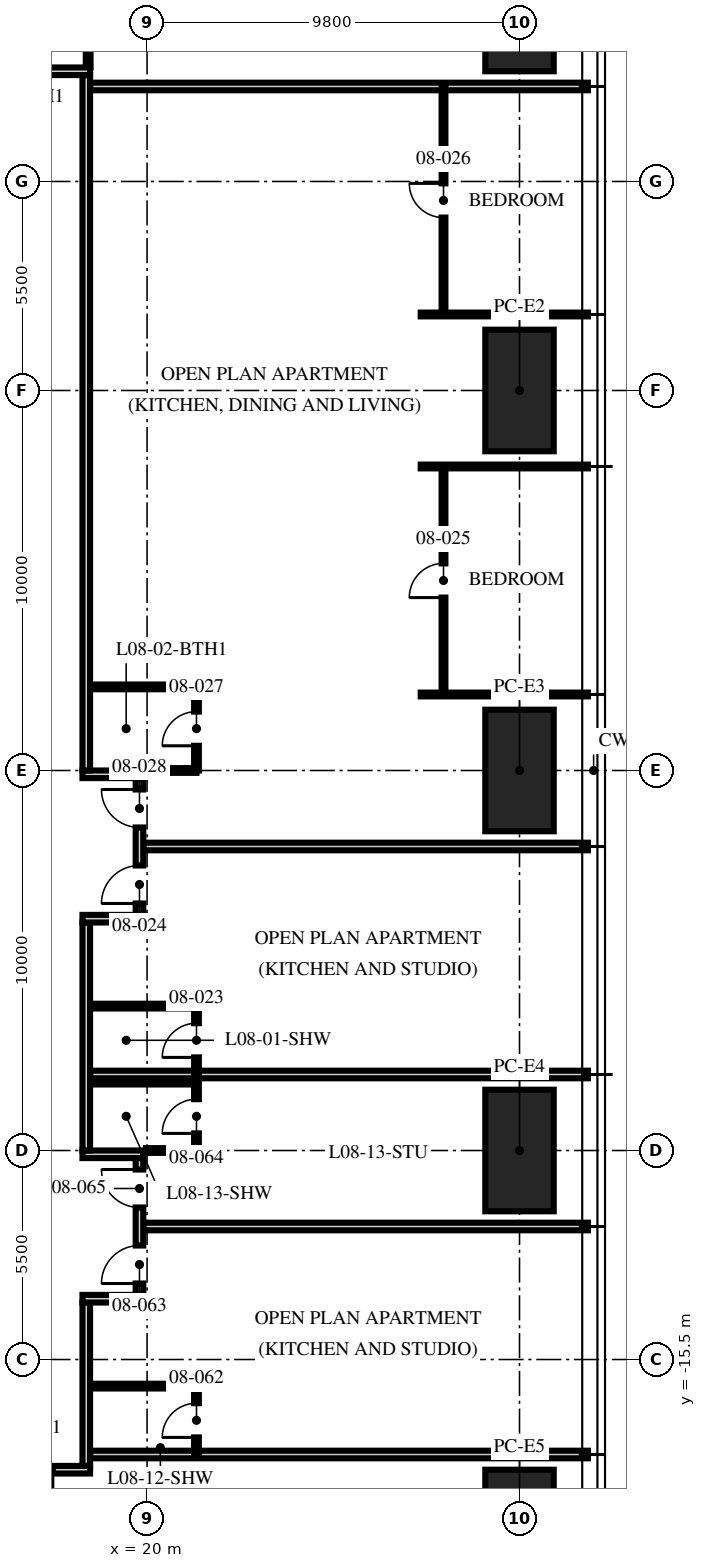
"""IFC4 building model, lengths in metres.
Left out: names, types, materials, properties, quantities, classifications, styles, units other than length and angle.
Written with IfcOpenShell. Run it as: python <this file> out.ifc"""

import sys

from ifc_helpers import new_model, si_unit, direction, frame, frame_2d, origin, origin_2d, place, context, subcontext, project, spatial, rectangle, hollow_rectangle, extrude, element, fill, save


model = new_model("IFC4")
c1 = context("Model", 3, precision=1e-05, world=origin(), true_north=direction((0.0, 1.0)))
c2 = subcontext(c1, "Body", "Model", "MODEL_VIEW")
j1 = project(units=[si_unit("LENGTHUNIT", "METRE"), si_unit("PLANEANGLEUNIT", "RADIAN")], contexts=[c1])
p1 = place(None, origin())
s1 = spatial("IfcSite", under=j1, at=p1, CompositionType="ELEMENT")
p2 = place(p1, origin())
s2 = spatial("IfcBuilding", under=s1, at=p2, CompositionType="ELEMENT")
p3 = place(p2, frame((0.0, 0.0, 36.0)))
s3 = spatial("IfcBuildingStorey", under=s2, at=p3, CompositionType="ELEMENT", Elevation=36.0)
for number, where, z_axis, x_axis in (
    (1, (29.8, 20.0, 0.0), (0.0, 0.0, 1.0), (0.0, 1.0, 0.0)),
    (2, (29.8, 10.0, 0.0), (0.0, 0.0, 1.0), (0.0, 1.0, 0.0)),
    (3, (29.8, 0.0, 0.0), (0.0, 0.0, 1.0), (0.0, 1.0, 0.0)),
    (4, (29.8, -10.0, 0.0), (0.0, 0.0, 1.0), (0.0, 1.0, 0.0)),
    (5, (29.8, -20.0, 0.0), (0.0, 0.0, 1.0), (0.0, 1.0, 0.0)),
):
    element("IfcColumn", number, at=place(p3, frame(where, z_axis=z_axis, x_axis=x_axis)), inside=s3, PredefinedType="COLUMN", context=c2, shape_type="SweptSolid", body=[
        extrude(hollow_rectangle(XDim=3.2, YDim=1.8, WallThickness=0.2, at=origin_2d()), origin(), (0.0, 0.0, 1.0), 3.75),
    ])
p4 = place(p3, frame((18.5, -8.0, 0.0), z_axis=(0.0, 0.0, 1.0), x_axis=(1.0, 0.0, 0.0)))
e6 = element("IfcWall", 6, at=p4, inside=s3, PredefinedType="PARTITIONING", context=c2, shape_type="SweptSolid", body=[
    extrude(rectangle(XDim=13.1, YDim=0.2, at=frame_2d((6.55, 0.0))), origin(), (0.0, 0.0, 1.0), 2.71),
])
p5 = place(p3, frame((19.9, -2.0, 0.0), z_axis=(0.0, 0.0, 1.0), x_axis=(1.0, 0.0, 0.0)))
e7 = element("IfcWall", 7, at=p5, inside=s3, PredefinedType="PARTITIONING", context=c2, shape_type="SweptSolid", body=[
    extrude(rectangle(XDim=11.7, YDim=0.2, at=frame_2d((5.85, 0.0))), origin(), (0.0, 0.0, 1.0), 2.71),
])
for number, where, z_axis, x_axis in (
    (8, (27.2, 2.0, 0.0), (0.0, 0.0, 1.0), (1.0, 0.0, 0.0)),
    (9, (27.2, 8.0, 0.0), (0.0, 0.0, 1.0), (1.0, 0.0, 0.0)),
    (10, (27.2, 12.0, 0.0), (0.0, 0.0, 1.0), (1.0, 0.0, 0.0)),
):
    element("IfcWall", number, at=place(p3, frame(where, z_axis=z_axis, x_axis=x_axis)), inside=s3, PredefinedType="PARTITIONING", context=c2, shape_type="SweptSolid", body=[
        extrude(rectangle(XDim=4.4, YDim=0.1, at=frame_2d((2.2, 0.0))), origin(), (0.0, 0.0, 1.0), 2.71),
    ])
for number, where, z_axis, x_axis in (
    (11, (18.5, 18.0, 0.0), (0.0, 0.0, 1.0), (1.0, 0.0, 0.0)),
    (12, (18.5, -18.0, 0.0), (0.0, 0.0, 1.0), (1.0, 0.0, 0.0)),
):
    element("IfcWall", number, at=place(p3, frame(where, z_axis=z_axis, x_axis=x_axis)), inside=s3, PredefinedType="PARTITIONING", context=c2, shape_type="SweptSolid", body=[
        extrude(rectangle(XDim=13.1, YDim=0.2, at=frame_2d((6.55, 0.0))), origin(), (0.0, 0.0, 1.0), 2.3),
    ])
p6 = place(p3, frame((19.9, -12.0, 0.0), z_axis=(0.0, 0.0, 1.0), x_axis=(1.0, 0.0, 0.0)))
e13 = element("IfcWall", 13, at=p6, inside=s3, PredefinedType="PARTITIONING", context=c2, shape_type="SweptSolid", body=[
    extrude(rectangle(XDim=11.7, YDim=0.2, at=frame_2d((5.85, 0.0))), origin(), (0.0, 0.0, 1.0), 2.71),
])
p7 = place(p3, frame((21.3, -8.0, 0.0), z_axis=(0.0, 0.0, 1.0), x_axis=(0.0, 1.0, 0.0)))
e14 = element("IfcWall", 14, at=p7, inside=s3, PredefinedType="PARTITIONING", context=c2, shape_type="SweptSolid", body=[
    extrude(rectangle(XDim=1.8, YDim=0.125, at=frame_2d((0.9, 0.0))), origin(), (0.0, 0.0, 1.0), 3.5),
])
p8 = place(p7, frame((0.45, 0.0, 0.0)))
e15 = element("IfcOpeningElement", 15, at=p8, cuts=e14, PredefinedType="OPENING", context=c2, shape_type="SweptSolid", body=[
    extrude(rectangle(XDim=0.9, YDim=2.1, at=frame_2d((0.45, 1.05))), frame((0.0, 0.073, 0.0), z_axis=(0.0, -1.0, 0.0), x_axis=(1.0, 0.0, 0.0)), (0.0, 0.0, 1.0), 0.145),
])
p9 = place(p3, frame((18.5, -6.2, 0.0), z_axis=(0.0, 0.0, 1.0), x_axis=(1.0, 0.0, 0.0)))
e16 = element("IfcWall", 16, at=p9, inside=s3, PredefinedType="PARTITIONING", context=c2, shape_type="SweptSolid", body=[
    extrude(rectangle(XDim=2.8, YDim=0.125, at=frame_2d((1.4, 0.0))), origin(), (0.0, 0.0, 1.0), 3.5),
])
p10 = place(p3, frame((27.8, 2.0, 0.0), z_axis=(0.0, 0.0, 1.0), x_axis=(0.0, 1.0, 0.0)))
e17 = element("IfcWall", 17, at=p10, inside=s3, PredefinedType="PARTITIONING", context=c2, shape_type="SweptSolid", body=[
    extrude(rectangle(XDim=6.0, YDim=0.1, at=frame_2d((3.0, 0.0))), origin(), (0.0, 0.0, 1.0), 2.61),
])
p11 = place(p10, frame((2.55, 0.0, 0.0)))
e18 = element("IfcOpeningElement", 18, at=p11, cuts=e17, PredefinedType="OPENING", context=c2, shape_type="SweptSolid", body=[
    extrude(rectangle(XDim=0.9, YDim=2.1, at=frame_2d((0.45, 1.05))), frame((0.0, 0.06, 0.0), z_axis=(0.0, -1.0, 0.0), x_axis=(1.0, 0.0, 0.0)), (0.0, 0.0, 1.0), 0.12),
])
p12 = place(p3, frame((27.8, 12.0, 0.0), z_axis=(0.0, 0.0, 1.0), x_axis=(0.0, 1.0, 0.0)))
e19 = element("IfcWall", 19, at=p12, inside=s3, PredefinedType="PARTITIONING", context=c2, shape_type="SweptSolid", body=[
    extrude(rectangle(XDim=6.0, YDim=0.1, at=frame_2d((3.0, 0.0))), origin(), (0.0, 0.0, 1.0), 2.61),
])
p13 = place(p12, frame((2.55, 0.0, 0.0)))
e20 = element("IfcOpeningElement", 20, at=p13, cuts=e19, PredefinedType="OPENING", context=c2, shape_type="SweptSolid", body=[
    extrude(rectangle(XDim=0.9, YDim=2.1, at=frame_2d((0.45, 1.05))), frame((0.0, 0.06, 0.0), z_axis=(0.0, -1.0, 0.0), x_axis=(1.0, 0.0, 0.0)), (0.0, 0.0, 1.0), 0.12),
])
p14 = place(p3, frame((21.3, 0.0, 0.0), z_axis=(0.0, 0.0, 1.0), x_axis=(0.0, 1.0, 0.0)))
e21 = element("IfcWall", 21, at=p14, inside=s3, PredefinedType="PARTITIONING", context=c2, shape_type="SweptSolid", body=[
    extrude(rectangle(XDim=2.2, YDim=0.125, at=frame_2d((1.1, 0.0))), origin(), (0.0, 0.0, 1.0), 2.492),
])
p15 = place(p14, frame((0.65, 0.0, 0.0)))
e22 = element("IfcOpeningElement", 22, at=p15, cuts=e21, PredefinedType="OPENING", context=c2, shape_type="SweptSolid", body=[
    extrude(rectangle(XDim=0.9, YDim=2.1, at=frame_2d((0.45, 1.05))), frame((0.0, 0.073, 0.0), z_axis=(0.0, -1.0, 0.0), x_axis=(1.0, 0.0, 0.0)), (0.0, 0.0, 1.0), 0.145),
])
p16 = place(p3, frame((19.97, 0.0, 0.0), z_axis=(0.0, 0.0, 1.0), x_axis=(1.0, 0.0, 0.0)))
e23 = element("IfcWall", 23, at=p16, inside=s3, PredefinedType="PARTITIONING", context=c2, shape_type="SweptSolid", body=[
    extrude(rectangle(XDim=1.33, YDim=0.125, at=frame_2d((0.665, 0.0))), origin(), (0.0, 0.0, 1.0), 2.492),
])
p17 = place(p3, frame((18.5, 2.2, 0.0), z_axis=(0.0, 0.0, 1.0), x_axis=(1.0, 0.0, 0.0)))
e24 = element("IfcWall", 24, at=p17, inside=s3, PredefinedType="PARTITIONING", context=c2, shape_type="SweptSolid", body=[
    extrude(rectangle(XDim=2.8, YDim=0.125, at=frame_2d((1.4, 0.0))), origin(), (0.0, 0.0, 1.0), 3.5),
])
p18 = place(p3, frame((18.45, 18.5, 0.0), z_axis=(0.0, 0.0, 1.0), x_axis=(0.0, 1.0, 0.0)))
e25 = element("IfcWall", 25, at=p18, inside=s3, PredefinedType="PARTITIONING", context=c2, shape_type="SweptSolid", body=[
    extrude(rectangle(XDim=2.8, YDim=0.125, at=frame_2d((1.4, 0.0))), origin(), (0.0, 0.0, 1.0), 2.3),
])
p19 = place(p3, frame((21.3, -18.0, 0.0), z_axis=(0.0, 0.0, 1.0), x_axis=(0.0, 1.0, 0.0)))
e26 = element("IfcWall", 26, at=p19, inside=s3, PredefinedType="PARTITIONING", context=c2, shape_type="SweptSolid", body=[
    extrude(rectangle(XDim=1.8, YDim=0.125, at=frame_2d((0.9, 0.0))), origin(), (0.0, 0.0, 1.0), 3.5),
])
p20 = place(p19, frame((0.45, 0.0, 0.0)))
e27 = element("IfcOpeningElement", 27, at=p20, cuts=e26, PredefinedType="OPENING", context=c2, shape_type="SweptSolid", body=[
    extrude(rectangle(XDim=0.9, YDim=2.1, at=frame_2d((0.45, 1.05))), frame((0.0, 0.073, 0.0), z_axis=(0.0, -1.0, 0.0), x_axis=(1.0, 0.0, 0.0)), (0.0, 0.0, 1.0), 0.145),
])
p21 = place(p3, frame((18.5, -16.2, 0.0), z_axis=(0.0, 0.0, 1.0), x_axis=(1.0, 0.0, 0.0)))
e28 = element("IfcWall", 28, at=p21, inside=s3, PredefinedType="PARTITIONING", context=c2, shape_type="SweptSolid", body=[
    extrude(rectangle(XDim=2.8, YDim=0.125, at=frame_2d((1.4, 0.0))), origin(), (0.0, 0.0, 1.0), 3.5),
])
p22 = place(p3, frame((21.3, -10.0, 0.0), z_axis=(0.0, 0.0, 1.0), x_axis=(0.0, 1.0, 0.0)))
e29 = element("IfcWall", 29, at=p22, inside=s3, PredefinedType="PARTITIONING", context=c2, shape_type="SweptSolid", body=[
    extrude(rectangle(XDim=1.8, YDim=0.125, at=frame_2d((0.9, 0.0))), origin(), (0.0, 0.0, 1.0), 2.492),
])
p23 = place(p22, frame((0.45, 0.0, 0.0)))
e30 = element("IfcOpeningElement", 30, at=p23, cuts=e29, PredefinedType="OPENING", context=c2, shape_type="SweptSolid", body=[
    extrude(rectangle(XDim=0.9, YDim=2.1, at=frame_2d((0.45, 1.05))), frame((0.0, 0.073, 0.0), z_axis=(0.0, -1.0, 0.0), x_axis=(1.0, 0.0, 0.0)), (0.0, 0.0, 1.0), 0.145),
])
p24 = place(p3, frame((19.97, -10.0, 0.0), z_axis=(0.0, 0.0, 1.0), x_axis=(1.0, 0.0, 0.0)))
e31 = element("IfcWall", 31, at=p24, inside=s3, PredefinedType="PARTITIONING", context=c2, shape_type="SweptSolid", body=[
    extrude(rectangle(XDim=1.33, YDim=0.125, at=frame_2d((0.665, 0.0))), origin(), (0.0, 0.0, 1.0), 2.492),
])
p25 = place(p3, frame((18.5, -8.2, 0.0), z_axis=(0.0, 0.0, 1.0), x_axis=(1.0, 0.0, 0.0)))
e32 = element("IfcWall", 32, at=p25, inside=s3, PredefinedType="PARTITIONING", context=c2, shape_type="SweptSolid", body=[
    extrude(rectangle(XDim=2.8, YDim=0.125, at=frame_2d((1.4, 0.0))), origin(), (0.0, 0.0, 1.0), 3.5),
])
p26 = place(p3, frame((18.4, -18.3, 0.0), z_axis=(0.0, 0.0, 1.0), x_axis=(0.0, 1.0, 0.0)))
e33 = element("IfcWall", 33, at=p26, inside=s3, PredefinedType="PARTITIONING", context=c2, shape_type="SweptSolid", body=[
    extrude(rectangle(XDim=4.3, YDim=0.2, at=frame_2d((2.15, 0.0))), origin(), (0.0, 0.0, 1.0), 2.3),
])
p27 = place(p3, frame((18.3, -13.9, 0.0), z_axis=(0.0, 0.0, 1.0), x_axis=(1.0, 0.0, 0.0)))
e34 = element("IfcWall", 34, at=p27, inside=s3, PredefinedType="PARTITIONING", context=c2, shape_type="SweptSolid", body=[
    extrude(rectangle(XDim=1.6, YDim=0.2, at=frame_2d((0.8, 0.0))), origin(), (0.0, 0.0, 1.0), 3.5),
])
p28 = place(p3, frame((18.3, -10.1, 0.0), z_axis=(0.0, 0.0, 1.0), x_axis=(1.0, 0.0, 0.0)))
e35 = element("IfcWall", 35, at=p28, inside=s3, PredefinedType="PARTITIONING", context=c2, shape_type="SweptSolid", body=[
    extrude(rectangle(XDim=1.6, YDim=0.2, at=frame_2d((0.8, 0.0))), origin(), (0.0, 0.0, 1.0), 2.492),
])
p29 = place(p3, frame((19.8, -13.8, 0.0), z_axis=(0.0, 0.0, 1.0), x_axis=(0.0, 1.0, 0.0)))
e36 = element("IfcWall", 36, at=p29, inside=s3, PredefinedType="PARTITIONING", context=c2, shape_type="SweptSolid", body=[
    extrude(rectangle(XDim=3.6, YDim=0.2, at=frame_2d((1.8, 0.0))), origin(), (0.0, 0.0, 1.0), 3.5),
])
p30 = place(p29, frame((0.3, 0.0, 0.0)))
e37 = element("IfcOpeningElement", 37, at=p30, cuts=e36, PredefinedType="OPENING", context=c2, shape_type="SweptSolid", body=[
    extrude(rectangle(XDim=1.0, YDim=2.2, at=frame_2d((0.5, 1.1))), frame((0.0, 0.11, 0.0), z_axis=(0.0, -1.0, 0.0), x_axis=(1.0, 0.0, 0.0)), (0.0, 0.0, 1.0), 0.22),
])
p31 = place(p29, frame((2.3, 0.0, 0.0)))
e38 = element("IfcOpeningElement", 38, at=p31, cuts=e36, PredefinedType="OPENING", context=c2, shape_type="SweptSolid", body=[
    extrude(rectangle(XDim=1.0, YDim=2.2, at=frame_2d((0.5, 1.1))), frame((0.0, 0.11, 0.0), z_axis=(0.0, -1.0, 0.0), x_axis=(1.0, 0.0, 0.0)), (0.0, 0.0, 1.0), 0.22),
])
p32 = place(p3, frame((18.4, -10.0, 0.0), z_axis=(0.0, 0.0, 1.0), x_axis=(0.0, 1.0, 0.0)))
e39 = element("IfcWall", 39, at=p32, inside=s3, PredefinedType="PARTITIONING", context=c2, shape_type="SweptSolid", body=[
    extrude(rectangle(XDim=6.0, YDim=0.2, at=frame_2d((3.0, 0.0))), origin(), (0.0, 0.0, 1.0), 2.492),
])
p33 = place(p3, frame((18.3, -3.9, 0.0), z_axis=(0.0, 0.0, 1.0), x_axis=(1.0, 0.0, 0.0)))
e40 = element("IfcWall", 40, at=p33, inside=s3, PredefinedType="PARTITIONING", context=c2, shape_type="SweptSolid", body=[
    extrude(rectangle(XDim=1.6, YDim=0.2, at=frame_2d((0.8, 0.0))), origin(), (0.0, 0.0, 1.0), 3.5),
])
p34 = place(p3, frame((18.3, -0.1, 0.0), z_axis=(0.0, 0.0, 1.0), x_axis=(1.0, 0.0, 0.0)))
e41 = element("IfcWall", 41, at=p34, inside=s3, PredefinedType="PARTITIONING", context=c2, shape_type="SweptSolid", body=[
    extrude(rectangle(XDim=1.6, YDim=0.2, at=frame_2d((0.8, 0.0))), origin(), (0.0, 0.0, 1.0), 2.492),
])
p35 = place(p3, frame((19.8, -3.8, 0.0), z_axis=(0.0, 0.0, 1.0), x_axis=(0.0, 1.0, 0.0)))
e42 = element("IfcWall", 42, at=p35, inside=s3, PredefinedType="PARTITIONING", context=c2, shape_type="SweptSolid", body=[
    extrude(rectangle(XDim=3.6, YDim=0.2, at=frame_2d((1.8, 0.0))), origin(), (0.0, 0.0, 1.0), 3.5),
])
p36 = place(p35, frame((0.3, 0.0, 0.0)))
e43 = element("IfcOpeningElement", 43, at=p36, cuts=e42, PredefinedType="OPENING", context=c2, shape_type="SweptSolid", body=[
    extrude(rectangle(XDim=1.0, YDim=2.2, at=frame_2d((0.5, 1.1))), frame((0.0, 0.11, 0.0), z_axis=(0.0, -1.0, 0.0), x_axis=(1.0, 0.0, 0.0)), (0.0, 0.0, 1.0), 0.22),
])
p37 = place(p35, frame((2.3, 0.0, 0.0)))
e44 = element("IfcOpeningElement", 44, at=p37, cuts=e42, PredefinedType="OPENING", context=c2, shape_type="SweptSolid", body=[
    extrude(rectangle(XDim=1.0, YDim=2.2, at=frame_2d((0.5, 1.1))), frame((0.0, 0.11, 0.0), z_axis=(0.0, -1.0, 0.0), x_axis=(1.0, 0.0, 0.0)), (0.0, 0.0, 1.0), 0.22),
])
p38 = place(p3, frame((18.4, 0.0, 0.0), z_axis=(0.0, 0.0, 1.0), x_axis=(0.0, 1.0, 0.0)))
e45 = element("IfcWall", 45, at=p38, inside=s3, PredefinedType="PARTITIONING", context=c2, shape_type="SweptSolid", body=[
    extrude(rectangle(XDim=18.3, YDim=0.2, at=frame_2d((9.15, 0.0))), origin(), (0.0, 0.0, 1.0), 2.3),
])
p39 = place(p3, frame((10.0, 18.4, 0.0), z_axis=(0.0, 0.0, 1.0), x_axis=(1.0, 0.0, 0.0)))
e46 = element("IfcWall", 46, at=p39, inside=s3, PredefinedType="PARTITIONING", context=c2, shape_type="SweptSolid", body=[
    extrude(rectangle(XDim=8.5, YDim=0.2, at=frame_2d((4.25, 0.0))), origin(), (0.0, 0.0, 1.0), 2.3),
])
p40 = place(p3, frame((18.5, -18.4, 0.0), z_axis=(0.0, 0.0, 1.0), x_axis=(-1.0, 0.0, 0.0)))
e47 = element("IfcWall", 47, at=p40, inside=s3, PredefinedType="PARTITIONING", context=c2, shape_type="SweptSolid", body=[
    extrude(rectangle(XDim=37.0, YDim=0.2, at=frame_2d((18.5, 0.0))), origin(), (0.0, 0.0, 1.0), 2.3),
])
p41 = place(p40, frame((26.93, 0.0, 0.0)))
e48 = element("IfcOpeningElement", 48, at=p41, cuts=e47, PredefinedType="OPENING", context=c2, shape_type="SweptSolid", body=[
    extrude(rectangle(XDim=1.0, YDim=2.2, at=frame_2d((0.5, 1.1))), frame((0.0, 0.11, 0.0), z_axis=(0.0, -1.0, 0.0), x_axis=(1.0, 0.0, 0.0)), (0.0, 0.0, 1.0), 0.22),
])
p42 = place(p40, frame((0.98, 0.0, 0.0)))
e49 = element("IfcOpeningElement", 49, at=p42, cuts=e47, PredefinedType="OPENING", context=c2, shape_type="SweptSolid", body=[
    extrude(rectangle(XDim=1.0, YDim=2.2, at=frame_2d((0.5, 1.1))), frame((0.0, 0.11, 0.0), z_axis=(0.0, -1.0, 0.0), x_axis=(1.0, 0.0, 0.0)), (0.0, 0.0, 1.0), 0.22),
])
p43 = place(p8, origin())
e50 = element("IfcDoor", 50, at=p43, inside=s3, OperationType="SINGLE_SWING_LEFT", PredefinedType="DOOR", context=c2, shape_type="SweptSolid", body=[
    extrude(rectangle(XDim=0.9, YDim=2.1, at=frame_2d((0.45, 1.05))), frame((0.0, 0.025, 0.0), z_axis=(0.0, -1.0, 0.0), x_axis=(1.0, 0.0, 0.0)), (0.0, 0.0, 1.0), 0.05),
])
fill(e15, e50)
p44 = place(p36, origin())
e51 = element("IfcDoor", 51, at=p44, inside=s3, OperationType="SINGLE_SWING_LEFT", PredefinedType="DOOR", context=c2, shape_type="SweptSolid", body=[
    extrude(rectangle(XDim=1.0, YDim=2.2, at=frame_2d((0.5, 1.1))), frame((0.0, 0.025, 0.0), z_axis=(0.0, -1.0, 0.0), x_axis=(1.0, 0.0, 0.0)), (0.0, 0.0, 1.0), 0.05),
])
fill(e43, e51)
p45 = place(p11, origin())
e52 = element("IfcDoor", 52, at=p45, inside=s3, OperationType="SINGLE_SWING_LEFT", PredefinedType="DOOR", context=c2, shape_type="SweptSolid", body=[
    extrude(rectangle(XDim=0.9, YDim=2.1, at=frame_2d((0.45, 1.05))), frame((0.0, 0.025, 0.0), z_axis=(0.0, -1.0, 0.0), x_axis=(1.0, 0.0, 0.0)), (0.0, 0.0, 1.0), 0.05),
])
fill(e18, e52)
p46 = place(p13, origin())
e53 = element("IfcDoor", 53, at=p46, inside=s3, OperationType="SINGLE_SWING_RIGHT", PredefinedType="DOOR", context=c2, shape_type="SweptSolid", body=[
    extrude(rectangle(XDim=0.9, YDim=2.1, at=frame_2d((0.45, 1.05))), frame((0.0, 0.025, 0.0), z_axis=(0.0, -1.0, 0.0), x_axis=(1.0, 0.0, 0.0)), (0.0, 0.0, 1.0), 0.05),
])
fill(e20, e53)
p47 = place(p15, origin())
e54 = element("IfcDoor", 54, at=p47, inside=s3, OperationType="SINGLE_SWING_LEFT", PredefinedType="DOOR", context=c2, shape_type="SweptSolid", body=[
    extrude(rectangle(XDim=0.9, YDim=2.1, at=frame_2d((0.45, 1.05))), frame((0.0, 0.025, 0.0), z_axis=(0.0, -1.0, 0.0), x_axis=(1.0, 0.0, 0.0)), (0.0, 0.0, 1.0), 0.05),
])
fill(e22, e54)
p48 = place(p37, origin())
e55 = element("IfcDoor", 55, at=p48, inside=s3, OperationType="SINGLE_SWING_RIGHT", PredefinedType="DOOR", context=c2, shape_type="SweptSolid", body=[
    extrude(rectangle(XDim=1.0, YDim=2.2, at=frame_2d((0.5, 1.1))), frame((0.0, 0.025, 0.0), z_axis=(0.0, -1.0, 0.0), x_axis=(1.0, 0.0, 0.0)), (0.0, 0.0, 1.0), 0.05),
])
fill(e44, e55)
p49 = place(p42, origin())
e56 = element("IfcDoor", 56, at=p49, inside=s3, OperationType="SINGLE_SWING_LEFT", PredefinedType="DOOR", context=c2, shape_type="SweptSolid", body=[
    extrude(rectangle(XDim=1.0, YDim=2.2, at=frame_2d((0.5, 1.1))), frame((0.0, 0.025, 0.0), z_axis=(0.0, -1.0, 0.0), x_axis=(1.0, 0.0, 0.0)), (0.0, 0.0, 1.0), 0.05),
])
fill(e49, e56)
p50 = place(p20, origin())
e57 = element("IfcDoor", 57, at=p50, inside=s3, OperationType="SINGLE_SWING_LEFT", PredefinedType="DOOR", context=c2, shape_type="SweptSolid", body=[
    extrude(rectangle(XDim=0.9, YDim=2.1, at=frame_2d((0.45, 1.05))), frame((0.0, 0.025, 0.0), z_axis=(0.0, -1.0, 0.0), x_axis=(1.0, 0.0, 0.0)), (0.0, 0.0, 1.0), 0.05),
])
fill(e27, e57)
p51 = place(p30, origin())
e58 = element("IfcDoor", 58, at=p51, inside=s3, OperationType="SINGLE_SWING_LEFT", PredefinedType="DOOR", context=c2, shape_type="SweptSolid", body=[
    extrude(rectangle(XDim=1.0, YDim=2.2, at=frame_2d((0.5, 1.1))), frame((0.0, 0.025, 0.0), z_axis=(0.0, -1.0, 0.0), x_axis=(1.0, 0.0, 0.0)), (0.0, 0.0, 1.0), 0.05),
])
fill(e37, e58)
p52 = place(p23, origin())
e59 = element("IfcDoor", 59, at=p52, inside=s3, OperationType="SINGLE_SWING_LEFT", PredefinedType="DOOR", context=c2, shape_type="SweptSolid", body=[
    extrude(rectangle(XDim=0.9, YDim=2.1, at=frame_2d((0.45, 1.05))), frame((0.0, 0.025, 0.0), z_axis=(0.0, -1.0, 0.0), x_axis=(1.0, 0.0, 0.0)), (0.0, 0.0, 1.0), 0.05),
])
fill(e30, e59)
p53 = place(p31, origin())
e60 = element("IfcDoor", 60, at=p53, inside=s3, OperationType="SINGLE_SWING_RIGHT", PredefinedType="DOOR", context=c2, shape_type="SweptSolid", body=[
    extrude(rectangle(XDim=1.0, YDim=2.2, at=frame_2d((0.5, 1.1))), frame((0.0, 0.025, 0.0), z_axis=(0.0, -1.0, 0.0), x_axis=(1.0, 0.0, 0.0)), (0.0, 0.0, 1.0), 0.05),
])
fill(e38, e60)
save(model, sys.argv[1])
